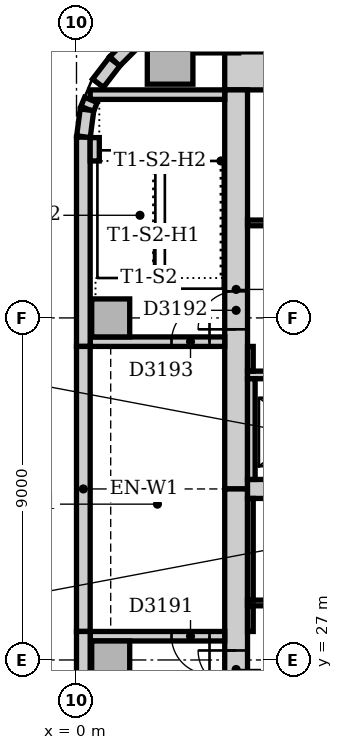
"""IFC4 building model, lengths in metres.
Left out: names, types, materials, properties, quantities, classifications, styles, units other than length and angle.
Written with IfcOpenShell. Run it as: python <this file> out.ifc"""

import sys

from ifc_helpers import new_model, si_unit, direction, frame, frame_2d, origin, origin_2d, place, context, subcontext, project, spatial, rectangle, extrude, element, fill, save


model = new_model("IFC4")
c1 = context("Model", 3, precision=1e-05, world=origin(), true_north=direction((0.0, 1.0)))
c2 = subcontext(c1, "Body", "Model", "MODEL_VIEW")
j1 = project(units=[si_unit("LENGTHUNIT", "METRE"), si_unit("PLANEANGLEUNIT", "RADIAN")], contexts=[c1])
p1 = place(None, origin())
s1 = spatial("IfcSite", under=j1, at=p1, CompositionType="ELEMENT")
p2 = place(p1, origin())
s2 = spatial("IfcBuilding", under=s1, at=p2, CompositionType="ELEMENT")
p3 = place(p2, frame((0.0, 0.0, 26.0)))
s3 = spatial("IfcBuildingStorey", under=s2, at=p3, CompositionType="ELEMENT", Elevation=26.0)
p4 = place(p3, frame((23.5, 42.5, 0.0), z_axis=(0.0, 0.0, 1.0), x_axis=(-1.0, 0.0, 0.0)))
e1 = element("IfcWall", 1, at=p4, inside=s3, PredefinedType="SOLIDWALL", context=c2, shape_type="SweptSolid", body=[
    extrude(rectangle(XDim=19.6, YDim=1.0, at=frame_2d((9.8, 0.0))), origin(), (0.0, 0.0, 1.0), 4.0),
])
p5 = place(p3, frame((4.2, 42.0, 0.0), z_axis=(0.0, 0.0, 1.0), x_axis=(0.0, -1.0, 0.0)))
e2 = element("IfcWall", 2, at=p5, inside=s3, PredefinedType="SOLIDWALL", context=c2, shape_type="SweptSolid", body=[
    extrude(rectangle(XDim=10.5, YDim=0.6, at=frame_2d((5.25, 0.0))), origin(), (0.0, 0.0, 1.0), 4.0),
])
p6 = place(p5, frame((5.3, 0.0, 0.0)))
e3 = element("IfcOpeningElement", 3, at=p6, cuts=e2, PredefinedType="OPENING", context=c2, shape_type="SweptSolid", body=[
    extrude(rectangle(XDim=1.0, YDim=2.1, at=frame_2d((0.5, 1.05))), frame((0.0, 0.31, 0.0), z_axis=(0.0, -1.0, 0.0), x_axis=(1.0, 0.0, 0.0)), (0.0, 0.0, 1.0), 0.62),
])
p7 = place(p3, frame((4.2, 31.5, 0.0), z_axis=(0.0, 0.0, 1.0), x_axis=(0.0, -1.0, 0.0)))
e4 = element("IfcWall", 4, at=p7, inside=s3, PredefinedType="SOLIDWALL", context=c2, shape_type="SweptSolid", body=[
    extrude(rectangle(XDim=10.5, YDim=0.6, at=frame_2d((5.25, 0.0))), origin(), (0.0, 0.0, 1.0), 4.0),
])
p8 = place(p7, frame((4.25, 0.0, 0.0)))
e5 = element("IfcOpeningElement", 5, at=p8, cuts=e4, PredefinedType="OPENING", context=c2, shape_type="SweptSolid", body=[
    extrude(rectangle(XDim=1.0, YDim=2.1, at=frame_2d((0.5, 1.05))), frame((0.0, 0.31, 0.0), z_axis=(0.0, -1.0, 0.0), x_axis=(1.0, 0.0, 0.0)), (0.0, 0.0, 1.0), 0.62),
])
p9 = place(p3, frame((4.5, 31.5, 0.0), z_axis=(0.0, 0.0, 1.0), x_axis=(1.0, 0.0, 0.0)))
e6 = element("IfcWall", 6, at=p9, inside=s3, PredefinedType="SOLIDWALL", context=c2, shape_type="SweptSolid", body=[
    extrude(rectangle(XDim=18.0, YDim=0.5, at=frame_2d((9.0, 0.0))), origin(), (0.0, 0.0, 1.0), 4.0),
])
p10 = place(p3, frame((3.9, 27.625, 0.0), z_axis=(0.0, 0.0, 1.0), x_axis=(-1.0, 0.0, 0.0)))
e7 = element("IfcWall", 7, at=p10, inside=s3, PredefinedType="SOLIDWALL", context=c2, shape_type="SweptSolid", body=[
    extrude(rectangle(XDim=3.54, YDim=0.25, at=frame_2d((1.77, 0.0))), origin(), (0.0, 0.0, 1.0), 4.0),
])
p11 = place(p10, frame((0.4, 0.0, 0.0)))
e8 = element("IfcOpeningElement", 8, at=p11, cuts=e7, PredefinedType="OPENING", context=c2, shape_type="SweptSolid", body=[
    extrude(rectangle(XDim=1.0, YDim=2.1, at=frame_2d((0.5, 1.05))), frame((0.0, 0.135, 0.0), z_axis=(0.0, -1.0, 0.0), x_axis=(1.0, 0.0, 0.0)), (0.0, 0.0, 1.0), 0.27),
])
p12 = place(p3, frame((0.36, 35.375, 0.0), z_axis=(0.0, 0.0, 1.0), x_axis=(1.0, 0.0, 0.0)))
e9 = element("IfcWall", 9, at=p12, inside=s3, PredefinedType="SOLIDWALL", context=c2, shape_type="SweptSolid", body=[
    extrude(rectangle(XDim=3.54, YDim=0.25, at=frame_2d((1.77, 0.0))), origin(), (0.0, 0.0, 1.0), 4.0),
])
p13 = place(p12, frame((2.14, 0.0, 0.0)))
e10 = element("IfcOpeningElement", 10, at=p13, cuts=e9, PredefinedType="OPENING", context=c2, shape_type="SweptSolid", body=[
    extrude(rectangle(XDim=1.0, YDim=2.1, at=frame_2d((0.5, 1.05))), frame((0.0, 0.135, 0.0), z_axis=(0.0, -1.0, 0.0), x_axis=(1.0, 0.0, 0.0)), (0.0, 0.0, 1.0), 0.27),
])
p14 = place(p3, frame((3.9, 41.875, 0.0), z_axis=(0.0, 0.0, 1.0), x_axis=(-1.0, 0.0, 0.0)))
e11 = element("IfcWall", 11, at=p14, inside=s3, PredefinedType="SOLIDWALL", context=c2, shape_type="SweptSolid", body=[
    extrude(rectangle(XDim=3.54, YDim=0.25, at=frame_2d((1.77, 0.0))), origin(), (0.0, 0.0, 1.0), 4.0),
])
for number, where, z_axis, x_axis in (
    (12, (3.667, 43.574, 0.0), (0.0, 0.0, 1.0), (1.0, 0.0, 0.0)),
    (13, (2.463, 42.75, 0.0), (0.0, 0.0, 1.0), (1.0, 0.0, 0.0)),
):
    element("IfcColumn", number, at=place(p3, frame(where, z_axis=z_axis, x_axis=x_axis)), inside=s3, PredefinedType="COLUMN", context=c2, shape_type="SweptSolid", body=[
        extrude(rectangle(XDim=1.2, YDim=1.2, at=origin_2d()), origin(), (0.0, 0.0, 1.0), 3.85),
    ])
for number, where, z_axis, x_axis in (
    (14, (0.9, 27.0, 0.0), (0.0, 0.0, 1.0), (1.0, 0.0, 0.0)),
    (15, (0.9, 36.0, 0.0), (0.0, 0.0, 1.0), (1.0, 0.0, 0.0)),
):
    element("IfcColumn", number, at=place(p3, frame(where, z_axis=z_axis, x_axis=x_axis)), inside=s3, PredefinedType="COLUMN", context=c2, shape_type="SweptSolid", body=[
        extrude(rectangle(XDim=1.0, YDim=1.0, at=origin_2d()), origin(), (0.0, 0.0, 1.0), 4.0),
    ])
p15 = place(p3, frame((2.249, 43.994, 0.0), z_axis=(0.0, 0.0, 1.0), x_axis=(-0.707106781187, -0.707106781187, 0.0)))
e16 = element("IfcWall", 16, at=p15, inside=s3, PredefinedType="STANDARD", context=c2, shape_type="SweptSolid", body=[
    extrude(rectangle(XDim=1.757, YDim=0.36, at=frame_2d((0.879, 0.0))), origin(), (0.0, 0.0, 1.0), 3.85),
])
p16 = place(p3, frame((0.18, 40.757, 0.0), z_axis=(0.0, 0.0, 1.0), x_axis=(0.0, -1.0, 0.0)))
e17 = element("IfcWall", 17, at=p16, inside=s3, PredefinedType="STANDARD", context=c2, shape_type="SweptSolid", body=[
    extrude(rectangle(XDim=5.507, YDim=0.36, at=frame_2d((2.754, 0.0))), origin(), (0.0, 0.0, 1.0), 3.85),
])
p17 = place(p3, frame((0.18, 35.25, 0.0), z_axis=(0.0, 0.0, 1.0), x_axis=(0.0, -1.0, 0.0)))
e18 = element("IfcWall", 18, at=p17, inside=s3, PredefinedType="STANDARD", context=c2, shape_type="SweptSolid", body=[
    extrude(rectangle(XDim=7.5, YDim=0.36, at=frame_2d((3.75, 0.0))), origin(), (0.0, 0.0, 1.0), 3.85),
])
p18 = place(p3, frame((0.18, 27.75, 0.0), z_axis=(0.0, 0.0, 1.0), x_axis=(0.0, -1.0, 0.0)))
e19 = element("IfcWall", 19, at=p18, inside=s3, PredefinedType="STANDARD", context=c2, shape_type="SweptSolid", body=[
    extrude(rectangle(XDim=6.75, YDim=0.36, at=frame_2d((3.375, 0.0))), origin(), (0.0, 0.0, 1.0), 3.85),
])
p19 = place(p3, frame((1.0, 42.741, 0.0), z_axis=(0.0, 0.0, 1.0), x_axis=(-0.608802368033, -0.793321924995, 0.0)))
e20 = element("IfcWall", 20, at=p19, inside=s3, PredefinedType="STANDARD", context=c2, shape_type="SweptSolid", body=[
    extrude(rectangle(XDim=0.713, YDim=0.36, at=frame_2d((0.357, 0.0))), origin(), (0.0, 0.0, 1.0), 3.85),
])
p20 = place(p3, frame((0.381, 41.736, 0.0), z_axis=(0.0, 0.0, 1.0), x_axis=(-0.382773360986, -0.923842277729, 0.0)))
e21 = element("IfcWall", 21, at=p20, inside=s3, PredefinedType="STANDARD", context=c2, shape_type="SweptSolid", body=[
    extrude(rectangle(XDim=0.258, YDim=0.36, at=frame_2d((0.129, 0.0))), origin(), (0.0, 0.0, 1.0), 3.85),
])
p21 = place(p3, frame((0.276, 41.476, 0.0), z_axis=(0.0, 0.0, 1.0), x_axis=(-0.13055608231, -0.99144092581, 0.0)))
e22 = element("IfcWall", 22, at=p21, inside=s3, PredefinedType="STANDARD", context=c2, shape_type="SweptSolid", body=[
    extrude(rectangle(XDim=0.713, YDim=0.36, at=frame_2d((0.356, 0.0))), origin(), (0.0, 0.0, 1.0), 3.85),
])
p22 = place(p3, frame((0.48, 40.13, 0.0), z_axis=(0.0, 0.0, 1.0), x_axis=(0.0, 1.0, 0.0)))
e23 = element("IfcWall", 23, at=p22, inside=s3, PredefinedType="STANDARD", context=c2, shape_type="SweptSolid", body=[
    extrude(rectangle(XDim=0.615, YDim=0.24, at=frame_2d((0.307, 0.0))), origin(), (0.0, 0.0, 1.0), 4.0),
])
p23 = place(p3, frame((4.5, 34.5, 0.0), z_axis=(0.0, 0.0, 1.0), x_axis=(1.0, 0.0, 0.0)))
e24 = element("IfcWall", 24, at=p23, inside=s3, PredefinedType="PARTITIONING", context=c2, shape_type="SweptSolid", body=[
    extrude(rectangle(XDim=18.0, YDim=0.2, at=frame_2d((9.0, 0.0))), origin(), (0.0, 0.0, 1.0), 3.85),
])
p24 = place(p23, frame((0.95, 0.0, 0.0)))
e25 = element("IfcOpeningElement", 25, at=p24, cuts=e24, PredefinedType="OPENING", context=c2, shape_type="SweptSolid", body=[
    extrude(rectangle(XDim=1.1, YDim=2.1, at=frame_2d((0.55, 1.05))), frame((0.0, 0.11, 0.0), z_axis=(0.0, -1.0, 0.0), x_axis=(1.0, 0.0, 0.0)), (0.0, 0.0, 1.0), 0.22),
])
p25 = place(p23, frame((3.95, 0.0, 0.0)))
e26 = element("IfcOpeningElement", 26, at=p25, cuts=e24, PredefinedType="OPENING", context=c2, shape_type="SweptSolid", body=[
    extrude(rectangle(XDim=1.1, YDim=2.1, at=frame_2d((0.55, 1.05))), frame((0.0, 0.11, 0.0), z_axis=(0.0, -1.0, 0.0), x_axis=(1.0, 0.0, 0.0)), (0.0, 0.0, 1.0), 0.22),
])
p26 = place(p23, frame((12.95, 0.0, 0.0)))
e27 = element("IfcOpeningElement", 27, at=p26, cuts=e24, PredefinedType="OPENING", context=c2, shape_type="SweptSolid", body=[
    extrude(rectangle(XDim=1.1, YDim=2.1, at=frame_2d((0.55, 1.05))), frame((0.0, 0.11, 0.0), z_axis=(0.0, -1.0, 0.0), x_axis=(1.0, 0.0, 0.0)), (0.0, 0.0, 1.0), 0.22),
])
p27 = place(p23, frame((15.95, 0.0, 0.0)))
e28 = element("IfcOpeningElement", 28, at=p27, cuts=e24, PredefinedType="OPENING", context=c2, shape_type="SweptSolid", body=[
    extrude(rectangle(XDim=1.1, YDim=2.1, at=frame_2d((0.55, 1.05))), frame((0.0, 0.11, 0.0), z_axis=(0.0, -1.0, 0.0), x_axis=(1.0, 0.0, 0.0)), (0.0, 0.0, 1.0), 0.22),
])
p28 = place(p3, frame((4.6, 31.75, 0.0), z_axis=(0.0, 0.0, 1.0), x_axis=(0.0, 1.0, 0.0)))
e29 = element("IfcWall", 29, at=p28, inside=s3, PredefinedType="PARTITIONING", context=c2, shape_type="SweptSolid", body=[
    extrude(rectangle(XDim=2.65, YDim=0.2, at=frame_2d((1.325, 0.0))), origin(), (0.0, 0.0, 1.0), 3.85),
])
p29 = place(p3, frame((4.5, 28.5, 0.0), z_axis=(0.0, 0.0, 1.0), x_axis=(1.0, 0.0, 0.0)))
e30 = element("IfcWall", 30, at=p29, inside=s3, PredefinedType="PARTITIONING", context=c2, shape_type="SweptSolid", body=[
    extrude(rectangle(XDim=18.0, YDim=0.15, at=frame_2d((9.0, 0.0))), origin(), (0.0, 0.0, 1.0), 3.85),
])
p30 = place(p29, frame((3.35, 0.0, 0.0)))
e31 = element("IfcOpeningElement", 31, at=p30, cuts=e30, PredefinedType="OPENING", context=c2, shape_type="SweptSolid", body=[
    extrude(rectangle(XDim=0.9, YDim=2.1, at=frame_2d((0.45, 1.05))), frame((0.0, 0.085, 0.0), z_axis=(0.0, -1.0, 0.0), x_axis=(1.0, 0.0, 0.0)), (0.0, 0.0, 1.0), 0.17),
])
p31 = place(p29, frame((8.55, 0.0, 0.0)))
e32 = element("IfcOpeningElement", 32, at=p31, cuts=e30, PredefinedType="OPENING", context=c2, shape_type="SweptSolid", body=[
    extrude(rectangle(XDim=0.9, YDim=2.1, at=frame_2d((0.45, 1.05))), frame((0.0, 0.085, 0.0), z_axis=(0.0, -1.0, 0.0), x_axis=(1.0, 0.0, 0.0)), (0.0, 0.0, 1.0), 0.17),
])
p32 = place(p29, frame((13.7, 0.0, 0.0)))
e33 = element("IfcOpeningElement", 33, at=p32, cuts=e30, PredefinedType="OPENING", context=c2, shape_type="SweptSolid", body=[
    extrude(rectangle(XDim=0.9, YDim=2.1, at=frame_2d((0.45, 1.05))), frame((0.0, 0.085, 0.0), z_axis=(0.0, -1.0, 0.0), x_axis=(1.0, 0.0, 0.0)), (0.0, 0.0, 1.0), 0.17),
])
p33 = place(p3, frame((4.5, 38.5, 0.0), z_axis=(0.0, 0.0, 1.0), x_axis=(1.0, 0.0, 0.0)))
e34 = element("IfcWall", 34, at=p33, inside=s3, PredefinedType="PARTITIONING", context=c2, shape_type="SweptSolid", body=[
    extrude(rectangle(XDim=11.9, YDim=0.15, at=frame_2d((5.95, 0.0))), origin(), (0.0, 0.0, 1.0), 3.85),
])
p34 = place(p33, frame((1.1, 0.0, 0.0)))
e35 = element("IfcOpeningElement", 35, at=p34, cuts=e34, PredefinedType="OPENING", context=c2, shape_type="SweptSolid", body=[
    extrude(rectangle(XDim=0.9, YDim=2.1, at=frame_2d((0.45, 1.05))), frame((0.0, 0.085, 0.0), z_axis=(0.0, -1.0, 0.0), x_axis=(1.0, 0.0, 0.0)), (0.0, 0.0, 1.0), 0.17),
])
p35 = place(p33, frame((3.3, 0.0, 0.0)))
e36 = element("IfcOpeningElement", 36, at=p35, cuts=e34, PredefinedType="OPENING", context=c2, shape_type="SweptSolid", body=[
    extrude(rectangle(XDim=0.9, YDim=2.1, at=frame_2d((0.45, 1.05))), frame((0.0, 0.085, 0.0), z_axis=(0.0, -1.0, 0.0), x_axis=(1.0, 0.0, 0.0)), (0.0, 0.0, 1.0), 0.17),
])
p36 = place(p33, frame((6.3, 0.0, 0.0)))
e37 = element("IfcOpeningElement", 37, at=p36, cuts=e34, PredefinedType="OPENING", context=c2, shape_type="SweptSolid", body=[
    extrude(rectangle(XDim=0.9, YDim=2.1, at=frame_2d((0.45, 1.05))), frame((0.0, 0.085, 0.0), z_axis=(0.0, -1.0, 0.0), x_axis=(1.0, 0.0, 0.0)), (0.0, 0.0, 1.0), 0.17),
])
p37 = place(p33, frame((9.95, 0.0, 0.0)))
e38 = element("IfcOpeningElement", 38, at=p37, cuts=e34, PredefinedType="OPENING", context=c2, shape_type="SweptSolid", body=[
    extrude(rectangle(XDim=0.8, YDim=2.1, at=frame_2d((0.4, 1.05))), frame((0.0, 0.085, 0.0), z_axis=(0.0, -1.0, 0.0), x_axis=(1.0, 0.0, 0.0)), (0.0, 0.0, 1.0), 0.17),
])
p38 = place(p3, frame((4.575, 27.75, 0.0), z_axis=(0.0, 0.0, 1.0), x_axis=(0.0, 1.0, 0.0)))
e39 = element("IfcWall", 39, at=p38, inside=s3, PredefinedType="PARTITIONING", context=c2, shape_type="SweptSolid", body=[
    extrude(rectangle(XDim=0.675, YDim=0.15, at=frame_2d((0.338, 0.0))), origin(), (0.0, 0.0, 1.0), 3.85),
])
p39 = place(p3, frame((4.575, 28.575, 0.0), z_axis=(0.0, 0.0, 1.0), x_axis=(0.0, 1.0, 0.0)))
e40 = element("IfcWall", 40, at=p39, inside=s3, PredefinedType="PARTITIONING", context=c2, shape_type="SweptSolid", body=[
    extrude(rectangle(XDim=2.675, YDim=0.15, at=frame_2d((1.337, 0.0))), origin(), (0.0, 0.0, 1.0), 3.85),
])
p40 = place(p3, frame((4.575, 34.6, 0.0), z_axis=(0.0, 0.0, 1.0), x_axis=(0.0, 1.0, 0.0)))
e41 = element("IfcWall", 41, at=p40, inside=s3, PredefinedType="PARTITIONING", context=c2, shape_type="SweptSolid", body=[
    extrude(rectangle(XDim=0.65, YDim=0.15, at=frame_2d((0.325, 0.0))), origin(), (0.0, 0.0, 1.0), 3.85),
])
p41 = place(p8, frame((1.0, 0.0, 0.0), z_axis=(0.0, 0.0, 1.0), x_axis=(-1.0, 0.0, 0.0)))
e42 = element("IfcDoor", 42, at=p41, inside=s3, OperationType="SINGLE_SWING_RIGHT", PredefinedType="DOOR", context=c2, shape_type="SweptSolid", body=[
    extrude(rectangle(XDim=1.0, YDim=2.1, at=frame_2d((0.5, 1.05))), frame((0.0, 0.025, 0.0), z_axis=(0.0, -1.0, 0.0), x_axis=(1.0, 0.0, 0.0)), (0.0, 0.0, 1.0), 0.05),
])
fill(e5, e42)
p42 = place(p11, origin())
e43 = element("IfcDoor", 43, at=p42, inside=s3, OperationType="SINGLE_SWING_LEFT", PredefinedType="DOOR", context=c2, shape_type="SweptSolid", body=[
    extrude(rectangle(XDim=1.0, YDim=2.1, at=frame_2d((0.5, 1.05))), frame((0.0, 0.025, 0.0), z_axis=(0.0, -1.0, 0.0), x_axis=(1.0, 0.0, 0.0)), (0.0, 0.0, 1.0), 0.05),
])
fill(e8, e43)
p43 = place(p6, frame((1.0, 0.0, 0.0), z_axis=(0.0, 0.0, 1.0), x_axis=(-1.0, 0.0, 0.0)))
e44 = element("IfcDoor", 44, at=p43, inside=s3, OperationType="SINGLE_SWING_LEFT", PredefinedType="DOOR", context=c2, shape_type="SweptSolid", body=[
    extrude(rectangle(XDim=1.0, YDim=2.1, at=frame_2d((0.5, 1.05))), frame((0.0, 0.025, 0.0), z_axis=(0.0, -1.0, 0.0), x_axis=(1.0, 0.0, 0.0)), (0.0, 0.0, 1.0), 0.05),
])
fill(e3, e44)
p44 = place(p13, origin())
e45 = element("IfcDoor", 45, at=p44, inside=s3, OperationType="SINGLE_SWING_RIGHT", PredefinedType="DOOR", context=c2, shape_type="SweptSolid", body=[
    extrude(rectangle(XDim=1.0, YDim=2.1, at=frame_2d((0.5, 1.05))), frame((0.0, 0.025, 0.0), z_axis=(0.0, -1.0, 0.0), x_axis=(1.0, 0.0, 0.0)), (0.0, 0.0, 1.0), 0.05),
])
fill(e10, e45)
save(model, sys.argv[1])
